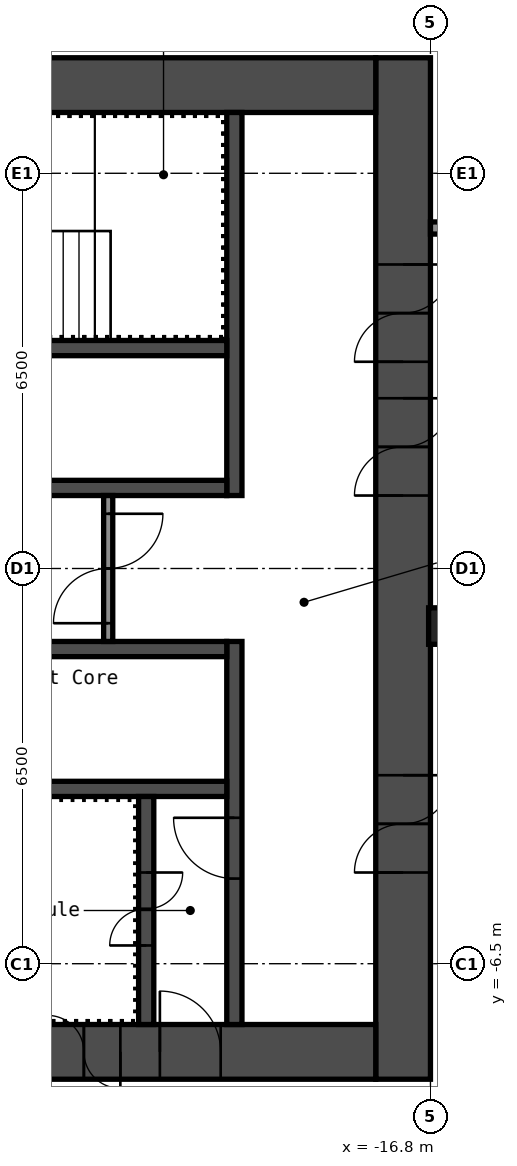
"""IFC4 building model, lengths in metres.
Left out: names, types, materials, properties, quantities, classifications, styles, units other than length and angle.
Written with IfcOpenShell. Run it as: python <this file> out.ifc"""

import sys

from ifc_helpers import new_model, si_unit, direction, frame, frame_2d, origin, origin_2d, place, context, subcontext, project, spatial, rectangle, hollow_rectangle, extrude, element, fill, save


model = new_model("IFC4")
c1 = context("Model", 3, precision=1e-05, world=origin(), true_north=direction((0.0, 1.0)))
c2 = subcontext(c1, "Body", "Model", "MODEL_VIEW")
j1 = project(units=[si_unit("LENGTHUNIT", "METRE"), si_unit("PLANEANGLEUNIT", "RADIAN")], contexts=[c1])
p1 = place(None, origin())
s1 = spatial("IfcSite", under=j1, at=p1, CompositionType="ELEMENT")
p2 = place(p1, origin())
s2 = spatial("IfcBuilding", under=s1, at=p2, CompositionType="ELEMENT")
p3 = place(p2, frame((0.0, 0.0, 264.6)))
s3 = spatial("IfcBuildingStorey", under=s2, at=p3, CompositionType="ELEMENT", Elevation=264.6)
p4 = place(p3, frame((-16.53, -0.947, 0.0), z_axis=(0.0, 0.0, 1.0), x_axis=(1.0, 0.0, 0.0)))
e1 = element("IfcColumn", 1, at=p4, inside=s3, PredefinedType="COLUMN", context=c2, shape_type="SweptSolid", body=[
    extrude(hollow_rectangle(XDim=0.6, YDim=0.6, WallThickness=0.025, InnerFilletRadius=0.038, OuterFilletRadius=0.062, at=origin_2d()), origin(), (0.0, 0.0, 1.0), 5.55),
])
p5 = place(p3, frame((-17.25, -8.4, 0.0), z_axis=(0.0, 0.0, 1.0), x_axis=(0.0, 1.0, 0.0)))
e2 = element("IfcWall", 2, at=p5, inside=s3, PredefinedType="SHEAR", context=c2, shape_type="SweptSolid", body=[
    extrude(rectangle(XDim=16.8, YDim=0.9, at=frame_2d((8.4, 0.0))), origin(), (0.0, 0.0, 1.0), 5.55),
])
p6 = place(p5, frame((3.4, 0.0, 0.0)))
e3 = element("IfcOpeningElement", 3, at=p6, cuts=e2, PredefinedType="OPENING", context=c2, shape_type="SweptSolid", body=[
    extrude(rectangle(XDim=1.6, YDim=2.1, at=frame_2d((0.8, 1.05))), frame((0.0, 0.46, 0.0), z_axis=(0.0, -1.0, 0.0), x_axis=(1.0, 0.0, 0.0)), (0.0, 0.0, 1.0), 0.92),
])
p7 = place(p5, frame((9.6, 0.0, 0.0)))
e4 = element("IfcOpeningElement", 4, at=p7, cuts=e2, PredefinedType="OPENING", context=c2, shape_type="SweptSolid", body=[
    extrude(rectangle(XDim=1.6, YDim=2.1, at=frame_2d((0.8, 1.05))), frame((0.0, 0.46, 0.0), z_axis=(0.0, -1.0, 0.0), x_axis=(1.0, 0.0, 0.0)), (0.0, 0.0, 1.0), 0.92),
])
p8 = place(p5, frame((11.8, 0.0, 0.0)))
e5 = element("IfcOpeningElement", 5, at=p8, cuts=e2, PredefinedType="OPENING", context=c2, shape_type="SweptSolid", body=[
    extrude(rectangle(XDim=1.6, YDim=2.1, at=frame_2d((0.8, 1.05))), frame((0.0, 0.46, 0.0), z_axis=(0.0, -1.0, 0.0), x_axis=(1.0, 0.0, 0.0)), (0.0, 0.0, 1.0), 0.92),
])
p9 = place(p3, frame((-32.7, 7.95, 0.0), z_axis=(0.0, 0.0, 1.0), x_axis=(1.0, 0.0, 0.0)))
e6 = element("IfcWall", 6, at=p9, inside=s3, PredefinedType="SHEAR", context=c2, shape_type="SweptSolid", body=[
    extrude(rectangle(XDim=15.0, YDim=0.9, at=frame_2d((7.5, 0.0))), origin(), (0.0, 0.0, 1.0), 5.55),
])
p10 = place(p9, frame((3.4, 0.0, 0.0)))
e7 = element("IfcOpeningElement", 7, at=p10, cuts=e6, PredefinedType="OPENING", context=c2, shape_type="SweptSolid", body=[
    extrude(rectangle(XDim=1.2, YDim=2.1, at=frame_2d((0.6, 1.05))), frame((0.0, 0.46, 0.0), z_axis=(0.0, -1.0, 0.0), x_axis=(1.0, 0.0, 0.0)), (0.0, 0.0, 1.0), 0.92),
])
p11 = place(p9, frame((0.75, 0.0, 0.0)))
e8 = element("IfcOpeningElement", 8, at=p11, cuts=e6, PredefinedType="OPENING", context=c2, shape_type="SweptSolid", body=[
    extrude(rectangle(XDim=0.9, YDim=2.1, at=frame_2d((0.45, 1.05))), frame((0.0, 0.46, 0.0), z_axis=(0.0, -1.0, 0.0), x_axis=(1.0, 0.0, 0.0)), (0.0, 0.0, 1.0), 0.92),
])
p12 = place(p9, frame((7.05, 0.0, 0.0)))
e9 = element("IfcOpeningElement", 9, at=p12, cuts=e6, PredefinedType="OPENING", context=c2, shape_type="SweptSolid", body=[
    extrude(rectangle(XDim=1.2, YDim=2.1, at=frame_2d((0.6, 1.05))), frame((0.0, 0.46, 0.0), z_axis=(0.0, -1.0, 0.0), x_axis=(1.0, 0.0, 0.0)), (0.0, 0.0, 1.0), 0.92),
])
p13 = place(p3, frame((-32.7, -7.95, 0.0), z_axis=(0.0, 0.0, 1.0), x_axis=(1.0, 0.0, 0.0)))
e10 = element("IfcWall", 10, at=p13, inside=s3, PredefinedType="SHEAR", context=c2, shape_type="SweptSolid", body=[
    extrude(rectangle(XDim=15.0, YDim=0.9, at=frame_2d((7.5, 0.0))), origin(), (0.0, 0.0, 1.0), 5.55),
])
p14 = place(p13, frame((11.45, 0.0, 0.0)))
e11 = element("IfcOpeningElement", 11, at=p14, cuts=e10, PredefinedType="OPENING", context=c2, shape_type="SweptSolid", body=[
    extrude(rectangle(XDim=1.0, YDim=2.1, at=frame_2d((0.5, 1.05))), frame((0.0, 0.46, 0.0), z_axis=(0.0, -1.0, 0.0), x_axis=(1.0, 0.0, 0.0)), (0.0, 0.0, 1.0), 0.92),
])
p15 = place(p13, frame((9.6, 0.0, 0.0)))
e12 = element("IfcOpeningElement", 12, at=p15, cuts=e10, PredefinedType="OPENING", context=c2, shape_type="SweptSolid", body=[
    extrude(rectangle(XDim=1.2, YDim=2.1, at=frame_2d((0.6, 1.05))), frame((0.0, 0.46, 0.0), z_axis=(0.0, -1.0, 0.0), x_axis=(1.0, 0.0, 0.0)), (0.0, 0.0, 1.0), 0.92),
])
p16 = place(p3, frame((-20.025, 1.2, 0.0), z_axis=(0.0, 0.0, 1.0), x_axis=(0.0, 1.0, 0.0)))
e13 = element("IfcWall", 13, at=p16, inside=s3, PredefinedType="SHEAR", context=c2, shape_type="SweptSolid", body=[
    extrude(rectangle(XDim=6.3, YDim=0.25, at=frame_2d((3.15, 0.0))), origin(), (0.0, 0.0, 1.0), 5.55),
])
p17 = place(p3, frame((-20.025, -7.5, 0.0), z_axis=(0.0, 0.0, 1.0), x_axis=(0.0, 1.0, 0.0)))
e14 = element("IfcWall", 14, at=p17, inside=s3, PredefinedType="SHEAR", context=c2, shape_type="SweptSolid", body=[
    extrude(rectangle(XDim=6.3, YDim=0.25, at=frame_2d((3.15, 0.0))), origin(), (0.0, 0.0, 1.0), 5.55),
])
p18 = place(p17, frame((2.4, 0.0, 0.0)))
e15 = element("IfcOpeningElement", 15, at=p18, cuts=e14, PredefinedType="OPENING", context=c2, shape_type="SweptSolid", body=[
    extrude(rectangle(XDim=1.0, YDim=2.1, at=frame_2d((0.5, 1.05))), frame((0.0, 0.135, 0.0), z_axis=(0.0, -1.0, 0.0), x_axis=(1.0, 0.0, 0.0)), (0.0, 0.0, 1.0), 0.27),
])
p19 = place(p3, frame((-27.65, 1.325, 0.0), z_axis=(0.0, 0.0, 1.0), x_axis=(1.0, 0.0, 0.0)))
e16 = element("IfcWall", 16, at=p19, inside=s3, PredefinedType="SHEAR", context=c2, shape_type="SweptSolid", body=[
    extrude(rectangle(XDim=7.5, YDim=0.25, at=frame_2d((3.75, 0.0))), origin(), (0.0, 0.0, 1.0), 5.55),
])
p20 = place(p19, frame((3.425, 0.0, 0.0)))
e17 = element("IfcOpeningElement", 17, at=p20, cuts=e16, PredefinedType="OPENING", context=c2, shape_type="SweptSolid", body=[
    extrude(rectangle(XDim=0.9, YDim=2.1, at=frame_2d((0.45, 1.05))), frame((0.0, 0.135, 0.0), z_axis=(0.0, -1.0, 0.0), x_axis=(1.0, 0.0, 0.0)), (0.0, 0.0, 1.0), 0.27),
])
for number, where, z_axis, x_axis in (
    (18, (-27.65, 3.625, 0.0), (0.0, 0.0, 1.0), (1.0, 0.0, 0.0)),
    (19, (-27.65, -1.325, 0.0), (0.0, 0.0, 1.0), (1.0, 0.0, 0.0)),
    (20, (-27.65, -3.625, 0.0), (0.0, 0.0, 1.0), (1.0, 0.0, 0.0)),
):
    element("IfcWall", number, at=place(p3, frame(where, z_axis=z_axis, x_axis=x_axis)), inside=s3, PredefinedType="SHEAR", context=c2, shape_type="SweptSolid", body=[
        extrude(rectangle(XDim=7.5, YDim=0.25, at=frame_2d((3.75, 0.0))), origin(), (0.0, 0.0, 1.0), 5.55),
    ])
p21 = place(p3, frame((-21.475, -7.5, 0.0), z_axis=(0.0, 0.0, 1.0), x_axis=(0.0, 1.0, 0.0)))
e21 = element("IfcWall", 21, at=p21, inside=s3, PredefinedType="SHEAR", context=c2, shape_type="SweptSolid", body=[
    extrude(rectangle(XDim=3.75, YDim=0.25, at=frame_2d((1.875, 0.0))), origin(), (0.0, 0.0, 1.0), 5.55),
])
p22 = place(p21, frame((1.3, 0.0, 0.0)))
e22 = element("IfcOpeningElement", 22, at=p22, cuts=e21, PredefinedType="OPENING", context=c2, shape_type="SweptSolid", body=[
    extrude(rectangle(XDim=1.2, YDim=2.1, at=frame_2d((0.6, 1.05))), frame((0.0, 0.135, 0.0), z_axis=(0.0, -1.0, 0.0), x_axis=(1.0, 0.0, 0.0)), (0.0, 0.0, 1.0), 0.27),
])
p23 = place(p3, frame((-22.1, -1.2, 0.0), z_axis=(0.0, 0.0, 1.0), x_axis=(0.0, 1.0, 0.0)))
e23 = element("IfcWall", 23, at=p23, inside=s3, PredefinedType="PARTITIONING", context=c2, shape_type="SweptSolid", body=[
    extrude(rectangle(XDim=2.4, YDim=0.15, at=frame_2d((1.2, 0.0))), origin(), (0.0, 0.0, 1.0), 5.55),
])
p24 = place(p23, frame((0.3, 0.0, 0.0)))
e24 = element("IfcOpeningElement", 24, at=p24, cuts=e23, PredefinedType="OPENING", context=c2, shape_type="SweptSolid", body=[
    extrude(rectangle(XDim=1.8, YDim=2.1, at=frame_2d((0.9, 1.05))), frame((0.0, 0.085, 0.0), z_axis=(0.0, -1.0, 0.0), x_axis=(1.0, 0.0, 0.0)), (0.0, 0.0, 1.0), 0.17),
])
p25 = place(p3, frame((-16.8, 5.6, 0.0), z_axis=(0.0, 0.0, 1.0), x_axis=(1.0, 0.0, 0.0)))
e25 = element("IfcWall", 25, at=p25, inside=s3, PredefinedType="PARTITIONING", context=c2, shape_type="SweptSolid", body=[
    extrude(rectangle(XDim=3.5, YDim=0.2, at=frame_2d((1.75, 0.0))), origin(), (0.0, 0.0, 1.0), 5.55),
])
p26 = place(p25, frame((1.1, 0.0, 0.0)))
e26 = element("IfcOpeningElement", 26, at=p26, cuts=e25, PredefinedType="OPENING", context=c2, shape_type="SweptSolid", body=[
    extrude(rectangle(XDim=1.6, YDim=2.1, at=frame_2d((0.8, 1.05))), frame((0.0, 0.11, 0.0), z_axis=(0.0, -1.0, 0.0), x_axis=(1.0, 0.0, 0.0)), (0.0, 0.0, 1.0), 0.22),
])
p27 = place(p6, origin())
e27 = element("IfcDoor", 27, at=p27, inside=s3, OperationType="DOUBLE_DOOR_SINGLE_SWING", PredefinedType="DOOR", context=c2, shape_type="SweptSolid", body=[
    extrude(rectangle(XDim=1.6, YDim=2.1, at=frame_2d((0.8, 1.05))), frame((0.0, 0.025, 0.0), z_axis=(0.0, -1.0, 0.0), x_axis=(1.0, 0.0, 0.0)), (0.0, 0.0, 1.0), 0.05),
])
fill(e3, e27)
p28 = place(p7, origin())
e28 = element("IfcDoor", 28, at=p28, inside=s3, OperationType="DOUBLE_DOOR_SINGLE_SWING", PredefinedType="DOOR", context=c2, shape_type="SweptSolid", body=[
    extrude(rectangle(XDim=1.6, YDim=2.1, at=frame_2d((0.8, 1.05))), frame((0.0, 0.025, 0.0), z_axis=(0.0, -1.0, 0.0), x_axis=(1.0, 0.0, 0.0)), (0.0, 0.0, 1.0), 0.05),
])
fill(e4, e28)
p29 = place(p8, origin())
e29 = element("IfcDoor", 29, at=p29, inside=s3, OperationType="DOUBLE_DOOR_SINGLE_SWING", PredefinedType="DOOR", context=c2, shape_type="SweptSolid", body=[
    extrude(rectangle(XDim=1.6, YDim=2.1, at=frame_2d((0.8, 1.05))), frame((0.0, 0.025, 0.0), z_axis=(0.0, -1.0, 0.0), x_axis=(1.0, 0.0, 0.0)), (0.0, 0.0, 1.0), 0.05),
])
fill(e5, e29)
p30 = place(p14, origin())
e30 = element("IfcDoor", 30, at=p30, inside=s3, OperationType="SINGLE_SWING_RIGHT", PredefinedType="DOOR", context=c2, shape_type="SweptSolid", body=[
    extrude(rectangle(XDim=1.0, YDim=2.1, at=frame_2d((0.5, 1.05))), frame((0.0, 0.025, 0.0), z_axis=(0.0, -1.0, 0.0), x_axis=(1.0, 0.0, 0.0)), (0.0, 0.0, 1.0), 0.05),
])
fill(e11, e30)
p31 = place(p15, origin())
e31 = element("IfcDoor", 31, at=p31, inside=s3, OperationType="DOUBLE_DOOR_SINGLE_SWING", PredefinedType="DOOR", context=c2, shape_type="SweptSolid", body=[
    extrude(rectangle(XDim=1.2, YDim=2.1, at=frame_2d((0.6, 1.05))), frame((0.0, 0.025, 0.0), z_axis=(0.0, -1.0, 0.0), x_axis=(1.0, 0.0, 0.0)), (0.0, 0.0, 1.0), 0.05),
])
fill(e12, e31)
p32 = place(p22, origin())
e32 = element("IfcDoor", 32, at=p32, inside=s3, OperationType="DOUBLE_DOOR_SINGLE_SWING", PredefinedType="DOOR", context=c2, shape_type="SweptSolid", body=[
    extrude(rectangle(XDim=1.2, YDim=2.1, at=frame_2d((0.6, 1.05))), frame((0.0, 0.025, 0.0), z_axis=(0.0, -1.0, 0.0), x_axis=(1.0, 0.0, 0.0)), (0.0, 0.0, 1.0), 0.05),
])
fill(e22, e32)
p33 = place(p18, origin())
e33 = element("IfcDoor", 33, at=p33, inside=s3, OperationType="SINGLE_SWING_LEFT", PredefinedType="DOOR", context=c2, shape_type="SweptSolid", body=[
    extrude(rectangle(XDim=1.0, YDim=2.1, at=frame_2d((0.5, 1.05))), frame((0.0, 0.025, 0.0), z_axis=(0.0, -1.0, 0.0), x_axis=(1.0, 0.0, 0.0)), (0.0, 0.0, 1.0), 0.05),
])
fill(e15, e33)
p34 = place(p24, origin())
e34 = element("IfcDoor", 34, at=p34, inside=s3, OperationType="DOUBLE_DOOR_SINGLE_SWING", PredefinedType="DOOR", context=c2, shape_type="SweptSolid", body=[
    extrude(rectangle(XDim=1.8, YDim=2.1, at=frame_2d((0.9, 1.05))), frame((0.0, 0.025, 0.0), z_axis=(0.0, -1.0, 0.0), x_axis=(1.0, 0.0, 0.0)), (0.0, 0.0, 1.0), 0.05),
])
fill(e24, e34)
save(model, sys.argv[1])
